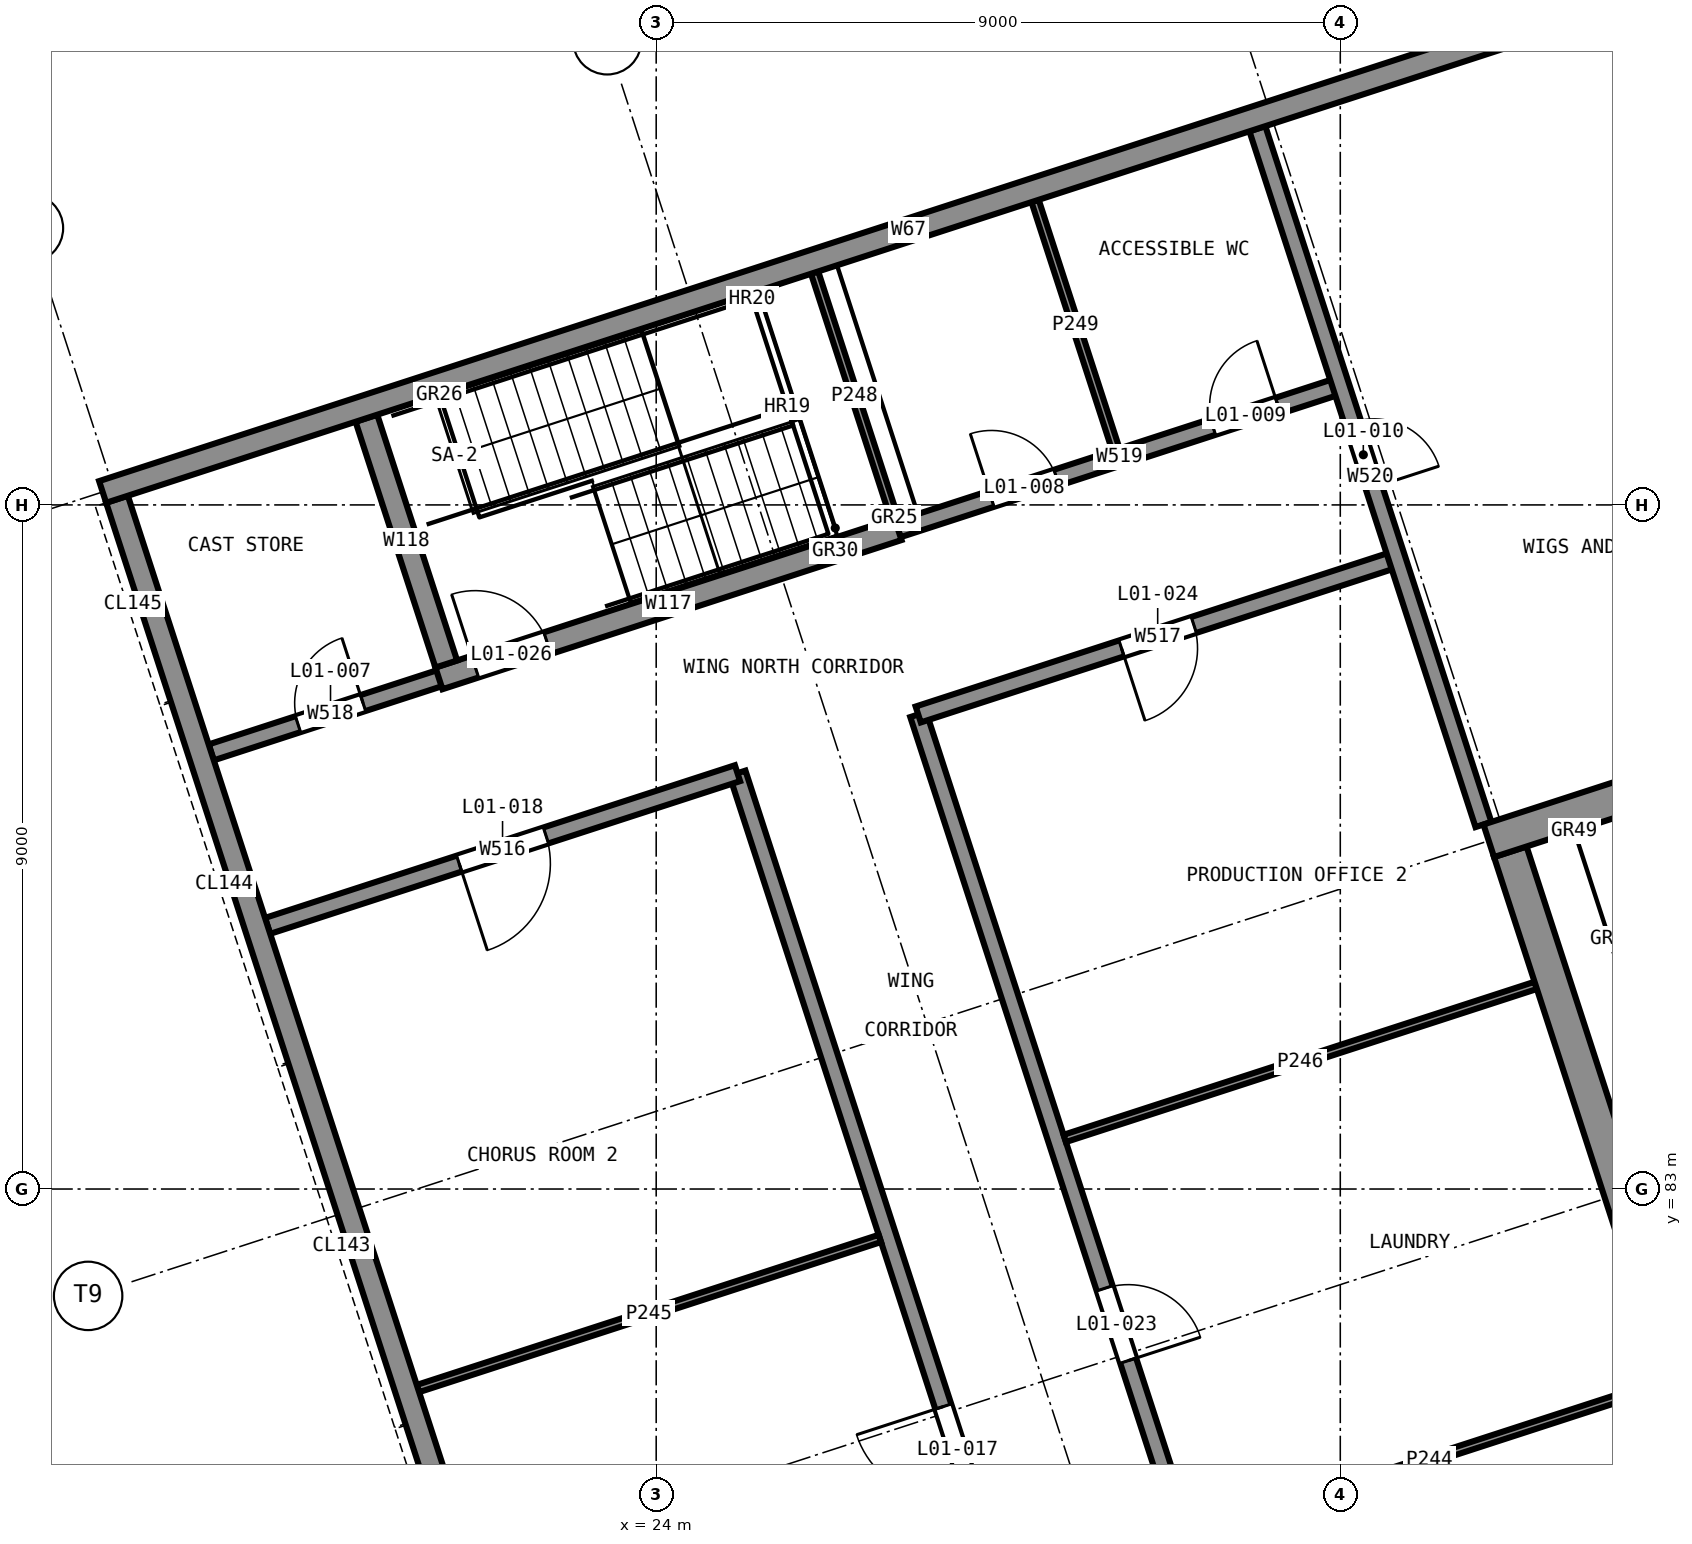
"""IFC4 building model, lengths in metres.
Left out: names, types, materials, properties, quantities, classifications, styles, units other than length and angle.
Written with IfcOpenShell. Run it as: python <this file> out.ifc"""

import sys

from ifc_helpers import new_model, si_unit, direction, frame, frame_2d, origin, place, context, subcontext, project, spatial, rectangle, extrude, element, fill, save


model = new_model("IFC4")
c1 = context("Model", 3, precision=1e-05, world=origin(), true_north=direction((0.0, 1.0)))
c2 = subcontext(c1, "Body", "Model", "MODEL_VIEW")
j1 = project(units=[si_unit("LENGTHUNIT", "METRE"), si_unit("PLANEANGLEUNIT", "RADIAN")], contexts=[c1])
p1 = place(None, origin())
s1 = spatial("IfcSite", under=j1, at=p1, CompositionType="ELEMENT")
p2 = place(p1, origin())
s2 = spatial("IfcBuilding", under=s1, at=p2, CompositionType="ELEMENT")
p3 = place(p2, frame((0.0, 0.0, 5.5)))
s3 = spatial("IfcBuildingStorey", under=s2, at=p3, CompositionType="ELEMENT", Elevation=5.5)
p4 = place(p3, frame((41.286, 68.82, 0.0), z_axis=(0.0, 0.0, 1.0), x_axis=(-0.309008517326, 0.951059270613, 0.0)))
e1 = element("IfcWall", 1, at=p4, inside=s3, PredefinedType="SHEAR", context=c2, shape_type="SweptSolid", body=[
    extrude(rectangle(XDim=19.575, YDim=0.45, at=frame_2d((9.788, 0.0))), origin(), (0.0, 0.0, 1.0), 4.0),
])
p5 = place(p3, frame((34.953, 87.581, 0.0), z_axis=(0.0, 0.0, 1.0), x_axis=(0.951059165148, 0.309008841924, 0.0)))
e2 = element("IfcWall", 2, at=p5, inside=s3, PredefinedType="SHEAR", context=c2, shape_type="SweptSolid", body=[
    extrude(rectangle(XDim=29.45, YDim=0.45, at=frame_2d((14.725, 0.0))), origin(), (0.0, 0.0, 1.0), 4.0),
])
p6 = place(p3, frame((33.501, 41.003, 0.0), z_axis=(0.0, 0.0, 1.0), x_axis=(-0.309017194826, 0.951056451165, 0.0)))
e3 = element("IfcWall", 3, at=p6, inside=s3, PredefinedType="SOLIDWALL", context=c2, shape_type="SweptSolid", body=[
    extrude(rectangle(XDim=53.7, YDim=0.3, at=frame_2d((26.85, 0.0))), origin(), (0.0, 0.0, 1.0), 4.0),
])
p7 = place(p6, frame((26.55, 0.0, 0.9)))
e4 = element("IfcOpeningElement", 4, at=p7, cuts=e3, PredefinedType="OPENING", context=c2, shape_type="SweptSolid", body=[
    extrude(rectangle(XDim=3.6, YDim=2.1, at=frame_2d((1.8, 1.05))), frame((0.0, 0.16, 0.0), z_axis=(0.0, -1.0, 0.0), x_axis=(1.0, 0.0, 0.0)), (0.0, 0.0, 1.0), 0.32),
])
p8 = place(p3, frame((16.718, 92.171, 0.0), z_axis=(0.0, 0.0, 1.0), x_axis=(0.951055789165, 0.309019232243, 0.0)))
e5 = element("IfcWall", 5, at=p8, inside=s3, PredefinedType="SOLIDWALL", context=c2, shape_type="SweptSolid", body=[
    extrude(rectangle(XDim=22.3, YDim=0.3, at=frame_2d((11.15, 0.0))), origin(), (0.0, 0.0, 1.0), 4.0),
])
p9 = place(p3, frame((27.181, 91.68, 0.0), z_axis=(0.0, 0.0, 1.0), x_axis=(-0.951051301895, -0.309033042189, 0.0)))
e6 = element("IfcWall", 6, at=p9, inside=s3, PredefinedType="SOLIDWALL", context=c2, shape_type="SweptSolid", body=[
    extrude(rectangle(XDim=6.35, YDim=0.3, at=frame_2d((3.175, 0.0))), origin(), (0.0, 0.0, 1.0), 3.7),
])
p10 = place(p9, frame((4.85, 0.0, 0.0)))
e7 = element("IfcOpeningElement", 7, at=p10, cuts=e6, PredefinedType="OPENING", context=c2, shape_type="SweptSolid", body=[
    extrude(rectangle(XDim=1.0, YDim=2.1, at=frame_2d((0.5, 1.05))), frame((0.0, 0.16, 0.0), z_axis=(0.0, -1.0, 0.0), x_axis=(1.0, 0.0, 0.0)), (0.0, 0.0, 1.0), 0.32),
])
p11 = place(p3, frame((21.238, 89.907, 0.0), z_axis=(0.0, 0.0, 1.0), x_axis=(-0.309066587596, 0.951040401051, 0.0)))
e8 = element("IfcWall", 8, at=p11, inside=s3, PredefinedType="SOLIDWALL", context=c2, shape_type="SweptSolid", body=[
    extrude(rectangle(XDim=3.4, YDim=0.3, at=frame_2d((1.7, 0.0))), origin(), (0.0, 0.0, 1.0), 3.7),
])
p12 = place(p3, frame((37.956, 48.812, 0.0), z_axis=(0.0, 0.0, 1.0), x_axis=(-0.30901736393, 0.951056396219, 0.0)))
e9 = element("IfcWall", 9, at=p12, inside=s3, PredefinedType="SOLIDWALL", context=c2, shape_type="SweptSolid", body=[
    extrude(rectangle(XDim=41.7, YDim=0.22, at=frame_2d((20.85, 0.0))), origin(), (0.0, 0.0, 1.0), 3.7),
])
p13 = place(p12, frame((2.009, 0.0, 0.0)))
e10 = element("IfcOpeningElement", 10, at=p13, cuts=e9, PredefinedType="OPENING", context=c2, shape_type="SweptSolid", body=[
    extrude(rectangle(XDim=1.0, YDim=2.1, at=frame_2d((0.5, 1.05))), frame((0.0, 0.12, 0.0), z_axis=(0.0, -1.0, 0.0), x_axis=(1.0, 0.0, 0.0)), (0.0, 0.0, 1.0), 0.24),
])
p14 = place(p12, frame((6.6, 0.0, 0.0)))
e11 = element("IfcOpeningElement", 11, at=p14, cuts=e9, PredefinedType="OPENING", context=c2, shape_type="SweptSolid", body=[
    extrude(rectangle(XDim=1.2, YDim=2.1, at=frame_2d((0.6, 1.05))), frame((0.0, 0.12, 0.0), z_axis=(0.0, -1.0, 0.0), x_axis=(1.0, 0.0, 0.0)), (0.0, 0.0, 1.0), 0.24),
])
p15 = place(p12, frame((11.7, 0.0, 0.0)))
e12 = element("IfcOpeningElement", 12, at=p15, cuts=e9, PredefinedType="OPENING", context=c2, shape_type="SweptSolid", body=[
    extrude(rectangle(XDim=1.2, YDim=2.1, at=frame_2d((0.6, 1.05))), frame((0.0, 0.12, 0.0), z_axis=(0.0, -1.0, 0.0), x_axis=(1.0, 0.0, 0.0)), (0.0, 0.0, 1.0), 0.24),
])
p16 = place(p12, frame((16.7, 0.0, 0.0)))
e13 = element("IfcOpeningElement", 13, at=p16, cuts=e9, PredefinedType="OPENING", context=c2, shape_type="SweptSolid", body=[
    extrude(rectangle(XDim=1.2, YDim=2.1, at=frame_2d((0.6, 1.05))), frame((0.0, 0.12, 0.0), z_axis=(0.0, -1.0, 0.0), x_axis=(1.0, 0.0, 0.0)), (0.0, 0.0, 1.0), 0.24),
])
p17 = place(p12, frame((21.7, 0.0, 0.0)))
e14 = element("IfcOpeningElement", 14, at=p17, cuts=e9, PredefinedType="OPENING", context=c2, shape_type="SweptSolid", body=[
    extrude(rectangle(XDim=1.2, YDim=2.1, at=frame_2d((0.6, 1.05))), frame((0.0, 0.12, 0.0), z_axis=(0.0, -1.0, 0.0), x_axis=(1.0, 0.0, 0.0)), (0.0, 0.0, 1.0), 0.24),
])
p18 = place(p12, frame((26.7, 0.0, 0.0)))
e15 = element("IfcOpeningElement", 15, at=p18, cuts=e9, PredefinedType="OPENING", context=c2, shape_type="SweptSolid", body=[
    extrude(rectangle(XDim=1.2, YDim=2.1, at=frame_2d((0.6, 1.05))), frame((0.0, 0.12, 0.0), z_axis=(0.0, -1.0, 0.0), x_axis=(1.0, 0.0, 0.0)), (0.0, 0.0, 1.0), 0.24),
])
p19 = place(p12, frame((31.739, 0.0, 0.0)))
e16 = element("IfcOpeningElement", 16, at=p19, cuts=e9, PredefinedType="OPENING", context=c2, shape_type="SweptSolid", body=[
    extrude(rectangle(XDim=1.2, YDim=2.1, at=frame_2d((0.6, 1.05))), frame((0.0, 0.12, 0.0), z_axis=(0.0, -1.0, 0.0), x_axis=(1.0, 0.0, 0.0)), (0.0, 0.0, 1.0), 0.24),
])
p20 = place(p3, frame((40.333, 49.584, 0.0), z_axis=(0.0, 0.0, 1.0), x_axis=(-0.309015643281, 0.951056955291, 0.0)))
e17 = element("IfcWall", 17, at=p20, inside=s3, PredefinedType="SOLIDWALL", context=c2, shape_type="SweptSolid", body=[
    extrude(rectangle(XDim=41.7, YDim=0.22, at=frame_2d((20.85, 0.0))), origin(), (0.0, 0.0, 1.0), 3.7),
])
p21 = place(p20, frame((1.9, 0.0, 0.0)))
e18 = element("IfcOpeningElement", 18, at=p21, cuts=e17, PredefinedType="OPENING", context=c2, shape_type="SweptSolid", body=[
    extrude(rectangle(XDim=1.2, YDim=2.1, at=frame_2d((0.6, 1.05))), frame((0.0, 0.12, 0.0), z_axis=(0.0, -1.0, 0.0), x_axis=(1.0, 0.0, 0.0)), (0.0, 0.0, 1.0), 0.24),
])
p22 = place(p20, frame((8.285, 0.0, 0.0)))
e19 = element("IfcOpeningElement", 19, at=p22, cuts=e17, PredefinedType="OPENING", context=c2, shape_type="SweptSolid", body=[
    extrude(rectangle(XDim=1.0, YDim=2.1, at=frame_2d((0.5, 1.05))), frame((0.0, 0.12, 0.0), z_axis=(0.0, -1.0, 0.0), x_axis=(1.0, 0.0, 0.0)), (0.0, 0.0, 1.0), 0.24),
])
p23 = place(p20, frame((16.375, 0.0, 0.0)))
e20 = element("IfcOpeningElement", 20, at=p23, cuts=e17, PredefinedType="OPENING", context=c2, shape_type="SweptSolid", body=[
    extrude(rectangle(XDim=1.2, YDim=2.1, at=frame_2d((0.6, 1.05))), frame((0.0, 0.12, 0.0), z_axis=(0.0, -1.0, 0.0), x_axis=(1.0, 0.0, 0.0)), (0.0, 0.0, 1.0), 0.24),
])
p24 = place(p20, frame((25.752, 0.0, 0.0)))
e21 = element("IfcOpeningElement", 21, at=p24, cuts=e17, PredefinedType="OPENING", context=c2, shape_type="SweptSolid", body=[
    extrude(rectangle(XDim=1.0, YDim=2.1, at=frame_2d((0.5, 1.05))), frame((0.0, 0.12, 0.0), z_axis=(0.0, -1.0, 0.0), x_axis=(1.0, 0.0, 0.0)), (0.0, 0.0, 1.0), 0.24),
])
p25 = place(p20, frame((32.761, 0.0, 0.0)))
e22 = element("IfcOpeningElement", 22, at=p25, cuts=e17, PredefinedType="OPENING", context=c2, shape_type="SweptSolid", body=[
    extrude(rectangle(XDim=1.0, YDim=2.1, at=frame_2d((0.5, 1.05))), frame((0.0, 0.12, 0.0), z_axis=(0.0, -1.0, 0.0), x_axis=(1.0, 0.0, 0.0)), (0.0, 0.0, 1.0), 0.24),
])
p26 = place(p3, frame((18.888, 86.462, 0.0), z_axis=(0.0, 0.0, 1.0), x_axis=(0.951059735424, 0.30900708674, 0.0)))
e23 = element("IfcWall", 23, at=p26, inside=s3, PredefinedType="SOLIDWALL", context=c2, shape_type="SweptSolid", body=[
    extrude(rectangle(XDim=6.5, YDim=0.22, at=frame_2d((3.25, 0.0))), origin(), (0.0, 0.0, 1.0), 3.7),
])
p27 = place(p26, frame((2.65, 0.0, 0.0)))
e24 = element("IfcOpeningElement", 24, at=p27, cuts=e23, PredefinedType="OPENING", context=c2, shape_type="SweptSolid", body=[
    extrude(rectangle(XDim=1.2, YDim=2.1, at=frame_2d((0.6, 1.05))), frame((0.0, 0.12, 0.0), z_axis=(0.0, -1.0, 0.0), x_axis=(1.0, 0.0, 0.0)), (0.0, 0.0, 1.0), 0.24),
])
p28 = place(p3, frame((27.447, 89.243, 0.0), z_axis=(0.0, 0.0, 1.0), x_axis=(0.951062229373, 0.308999410776, 0.0)))
e25 = element("IfcWall", 25, at=p28, inside=s3, PredefinedType="SOLIDWALL", context=c2, shape_type="SweptSolid", body=[
    extrude(rectangle(XDim=6.625, YDim=0.22, at=frame_2d((3.312, 0.0))), origin(), (0.0, 0.0, 1.0), 3.7),
])
p29 = place(p28, frame((2.812, 0.0, 0.0)))
e26 = element("IfcOpeningElement", 26, at=p29, cuts=e25, PredefinedType="OPENING", context=c2, shape_type="SweptSolid", body=[
    extrude(rectangle(XDim=1.0, YDim=2.1, at=frame_2d((0.5, 1.05))), frame((0.0, 0.12, 0.0), z_axis=(0.0, -1.0, 0.0), x_axis=(1.0, 0.0, 0.0)), (0.0, 0.0, 1.0), 0.24),
])
p30 = place(p3, frame((18.146, 88.744, 0.0), z_axis=(0.0, 0.0, 1.0), x_axis=(0.951053095941, 0.309027520945, 0.0)))
e27 = element("IfcWall", 27, at=p30, inside=s3, PredefinedType="SOLIDWALL", context=c2, shape_type="SweptSolid", body=[
    extrude(rectangle(XDim=3.3, YDim=0.22, at=frame_2d((1.65, 0.0))), origin(), (0.0, 0.0, 1.0), 3.7),
])
p31 = place(p30, frame((1.2, 0.0, 0.0)))
e28 = element("IfcOpeningElement", 28, at=p31, cuts=e27, PredefinedType="OPENING", context=c2, shape_type="SweptSolid", body=[
    extrude(rectangle(XDim=0.9, YDim=2.1, at=frame_2d((0.45, 1.05))), frame((0.0, 0.12, 0.0), z_axis=(0.0, -1.0, 0.0), x_axis=(1.0, 0.0, 0.0)), (0.0, 0.0, 1.0), 0.24),
])
p32 = place(p3, frame((27.181, 91.68, 0.0), z_axis=(0.0, 0.0, 1.0), x_axis=(0.951063356831, 0.308995940577, 0.0)))
e29 = element("IfcWall", 29, at=p32, inside=s3, PredefinedType="SOLIDWALL", context=c2, shape_type="SweptSolid", body=[
    extrude(rectangle(XDim=6.125, YDim=0.22, at=frame_2d((3.062, 0.0))), origin(), (0.0, 0.0, 1.0), 3.7),
])
p33 = place(p32, frame((1.293, 0.0, 0.0)))
e30 = element("IfcOpeningElement", 30, at=p33, cuts=e29, PredefinedType="OPENING", context=c2, shape_type="SweptSolid", body=[
    extrude(rectangle(XDim=0.9, YDim=2.1, at=frame_2d((0.45, 1.05))), frame((0.0, 0.12, 0.0), z_axis=(0.0, -1.0, 0.0), x_axis=(1.0, 0.0, 0.0)), (0.0, 0.0, 1.0), 0.24),
])
p34 = place(p32, frame((4.357, 0.0, 0.0)))
e31 = element("IfcOpeningElement", 31, at=p34, cuts=e29, PredefinedType="OPENING", context=c2, shape_type="SweptSolid", body=[
    extrude(rectangle(XDim=0.9, YDim=2.1, at=frame_2d((0.45, 1.05))), frame((0.0, 0.12, 0.0), z_axis=(0.0, -1.0, 0.0), x_axis=(1.0, 0.0, 0.0)), (0.0, 0.0, 1.0), 0.24),
])
p35 = place(p3, frame((34.884, 87.795, 0.0), z_axis=(0.0, 0.0, 1.0), x_axis=(-0.309027569133, 0.951053080283, 0.0)))
e32 = element("IfcWall", 32, at=p35, inside=s3, PredefinedType="SOLIDWALL", context=c2, shape_type="SweptSolid", body=[
    extrude(rectangle(XDim=9.625, YDim=0.22, at=frame_2d((4.812, 0.0))), origin(), (0.0, 0.0, 1.0), 3.7),
])
p36 = place(p35, frame((4.665, 0.0, 0.0)))
e33 = element("IfcOpeningElement", 33, at=p36, cuts=e32, PredefinedType="OPENING", context=c2, shape_type="SweptSolid", body=[
    extrude(rectangle(XDim=0.9, YDim=2.1, at=frame_2d((0.45, 1.05))), frame((0.0, 0.12, 0.0), z_axis=(0.0, -1.0, 0.0), x_axis=(1.0, 0.0, 0.0)), (0.0, 0.0, 1.0), 0.24),
])
p37 = place(p3, frame((31.075, 78.435, 0.0), z_axis=(0.0, 0.0, 1.0), x_axis=(0.951058024796, 0.309012351648, 0.0)))
e34 = element("IfcWall", 34, at=p37, inside=s3, PredefinedType="PARTITIONING", context=c2, shape_type="SweptSolid", body=[
    extrude(rectangle(XDim=6.515, YDim=0.1, at=frame_2d((3.257, 0.0))), origin(), (0.0, 0.0, 1.0), 3.7),
])
p38 = place(p3, frame((20.865, 80.375, 0.0), z_axis=(0.0, 0.0, 1.0), x_axis=(0.951055405517, 0.309020412977, 0.0)))
e35 = element("IfcWall", 35, at=p38, inside=s3, PredefinedType="PARTITIONING", context=c2, shape_type="SweptSolid", body=[
    extrude(rectangle(XDim=6.39, YDim=0.1, at=frame_2d((3.195, 0.0))), origin(), (0.0, 0.0, 1.0), 3.7),
])
p39 = place(p3, frame((29.375, 83.666, 0.0), z_axis=(0.0, 0.0, 1.0), x_axis=(0.951061602966, 0.309001338773, 0.0)))
e36 = element("IfcWall", 36, at=p39, inside=s3, PredefinedType="PARTITIONING", context=c2, shape_type="SweptSolid", body=[
    extrude(rectangle(XDim=6.515, YDim=0.1, at=frame_2d((3.258, 0.0))), origin(), (0.0, 0.0, 1.0), 3.7),
])
p40 = place(p3, frame((27.135, 91.823, 0.0), z_axis=(0.0, 0.0, 1.0), x_axis=(-0.308980533303, 0.951068362443, 0.0)))
e37 = element("IfcWall", 37, at=p40, inside=s3, PredefinedType="PARTITIONING", context=c2, shape_type="SweptSolid", body=[
    extrude(rectangle(XDim=3.4, YDim=0.1, at=frame_2d((1.7, 0.0))), origin(), (0.0, 0.0, 1.0), 3.7),
])
p41 = place(p3, frame((30.048, 92.727, 0.0), z_axis=(0.0, 0.0, 1.0), x_axis=(-0.309021877853, 0.951054929543, 0.0)))
e38 = element("IfcWall", 38, at=p41, inside=s3, PredefinedType="PARTITIONING", context=c2, shape_type="SweptSolid", body=[
    extrude(rectangle(XDim=3.44, YDim=0.1, at=frame_2d((1.72, 0.0))), origin(), (0.0, 0.0, 1.0), 3.7),
])
p42 = place(p31, origin())
e39 = element("IfcDoor", 39, at=p42, inside=s3, OperationType="SINGLE_SWING_LEFT", PredefinedType="DOOR", context=c2, shape_type="SweptSolid", body=[
    extrude(rectangle(XDim=0.9, YDim=2.1, at=frame_2d((0.45, 1.05))), frame((0.0, 0.025, 0.0), z_axis=(0.0, -1.0, 0.0), x_axis=(1.0, 0.0, 0.0)), (0.0, 0.0, 1.0), 0.05),
])
fill(e28, e39)
p43 = place(p33, origin())
e40 = element("IfcDoor", 40, at=p43, inside=s3, OperationType="SINGLE_SWING_RIGHT", PredefinedType="DOOR", context=c2, shape_type="SweptSolid", body=[
    extrude(rectangle(XDim=0.9, YDim=2.1, at=frame_2d((0.45, 1.05))), frame((0.0, 0.025, 0.0), z_axis=(0.0, -1.0, 0.0), x_axis=(1.0, 0.0, 0.0)), (0.0, 0.0, 1.0), 0.05),
])
fill(e30, e40)
p44 = place(p34, origin())
e41 = element("IfcDoor", 41, at=p44, inside=s3, OperationType="SINGLE_SWING_LEFT", PredefinedType="DOOR", context=c2, shape_type="SweptSolid", body=[
    extrude(rectangle(XDim=0.9, YDim=2.1, at=frame_2d((0.45, 1.05))), frame((0.0, 0.025, 0.0), z_axis=(0.0, -1.0, 0.0), x_axis=(1.0, 0.0, 0.0)), (0.0, 0.0, 1.0), 0.05),
])
fill(e31, e41)
p45 = place(p36, frame((0.9, 0.0, 0.0), z_axis=(0.0, 0.0, 1.0), x_axis=(-1.0, 0.0, 0.0)))
e42 = element("IfcDoor", 42, at=p45, inside=s3, OperationType="SINGLE_SWING_LEFT", PredefinedType="DOOR", context=c2, shape_type="SweptSolid", body=[
    extrude(rectangle(XDim=0.9, YDim=2.1, at=frame_2d((0.45, 1.05))), frame((0.0, 0.025, 0.0), z_axis=(0.0, -1.0, 0.0), x_axis=(1.0, 0.0, 0.0)), (0.0, 0.0, 1.0), 0.05),
])
fill(e33, e42)
p46 = place(p19, origin())
e43 = element("IfcDoor", 43, at=p46, inside=s3, OperationType="SINGLE_SWING_LEFT", PredefinedType="DOOR", context=c2, shape_type="SweptSolid", body=[
    extrude(rectangle(XDim=1.2, YDim=2.1, at=frame_2d((0.6, 1.05))), frame((0.0, 0.025, 0.0), z_axis=(0.0, -1.0, 0.0), x_axis=(1.0, 0.0, 0.0)), (0.0, 0.0, 1.0), 0.05),
])
fill(e16, e43)
p47 = place(p27, frame((1.2, 0.0, 0.0), z_axis=(0.0, 0.0, 1.0), x_axis=(-1.0, 0.0, 0.0)))
e44 = element("IfcDoor", 44, at=p47, inside=s3, OperationType="SINGLE_SWING_LEFT", PredefinedType="DOOR", context=c2, shape_type="SweptSolid", body=[
    extrude(rectangle(XDim=1.2, YDim=2.1, at=frame_2d((0.6, 1.05))), frame((0.0, 0.025, 0.0), z_axis=(0.0, -1.0, 0.0), x_axis=(1.0, 0.0, 0.0)), (0.0, 0.0, 1.0), 0.05),
])
fill(e24, e44)
p48 = place(p25, frame((1.0, 0.0, 0.0), z_axis=(0.0, 0.0, 1.0), x_axis=(-1.0, 0.0, 0.0)))
e45 = element("IfcDoor", 45, at=p48, inside=s3, OperationType="SINGLE_SWING_LEFT", PredefinedType="DOOR", context=c2, shape_type="SweptSolid", body=[
    extrude(rectangle(XDim=1.0, YDim=2.1, at=frame_2d((0.5, 1.05))), frame((0.0, 0.025, 0.0), z_axis=(0.0, -1.0, 0.0), x_axis=(1.0, 0.0, 0.0)), (0.0, 0.0, 1.0), 0.05),
])
fill(e22, e45)
p49 = place(p29, frame((1.0, 0.0, 0.0), z_axis=(0.0, 0.0, 1.0), x_axis=(-1.0, 0.0, 0.0)))
e46 = element("IfcDoor", 46, at=p49, inside=s3, OperationType="SINGLE_SWING_LEFT", PredefinedType="DOOR", context=c2, shape_type="SweptSolid", body=[
    extrude(rectangle(XDim=1.0, YDim=2.1, at=frame_2d((0.5, 1.05))), frame((0.0, 0.025, 0.0), z_axis=(0.0, -1.0, 0.0), x_axis=(1.0, 0.0, 0.0)), (0.0, 0.0, 1.0), 0.05),
])
fill(e26, e46)
p50 = place(p10, frame((1.0, 0.0, 0.0), z_axis=(0.0, 0.0, 1.0), x_axis=(-1.0, 0.0, 0.0)))
e47 = element("IfcDoor", 47, at=p50, inside=s3, OperationType="SINGLE_SWING_RIGHT", PredefinedType="DOOR", context=c2, shape_type="SweptSolid", body=[
    extrude(rectangle(XDim=1.0, YDim=2.1, at=frame_2d((0.5, 1.05))), frame((0.0, 0.025, 0.0), z_axis=(0.0, -1.0, 0.0), x_axis=(1.0, 0.0, 0.0)), (0.0, 0.0, 1.0), 0.05),
])
fill(e7, e47)
save(model, sys.argv[1])
